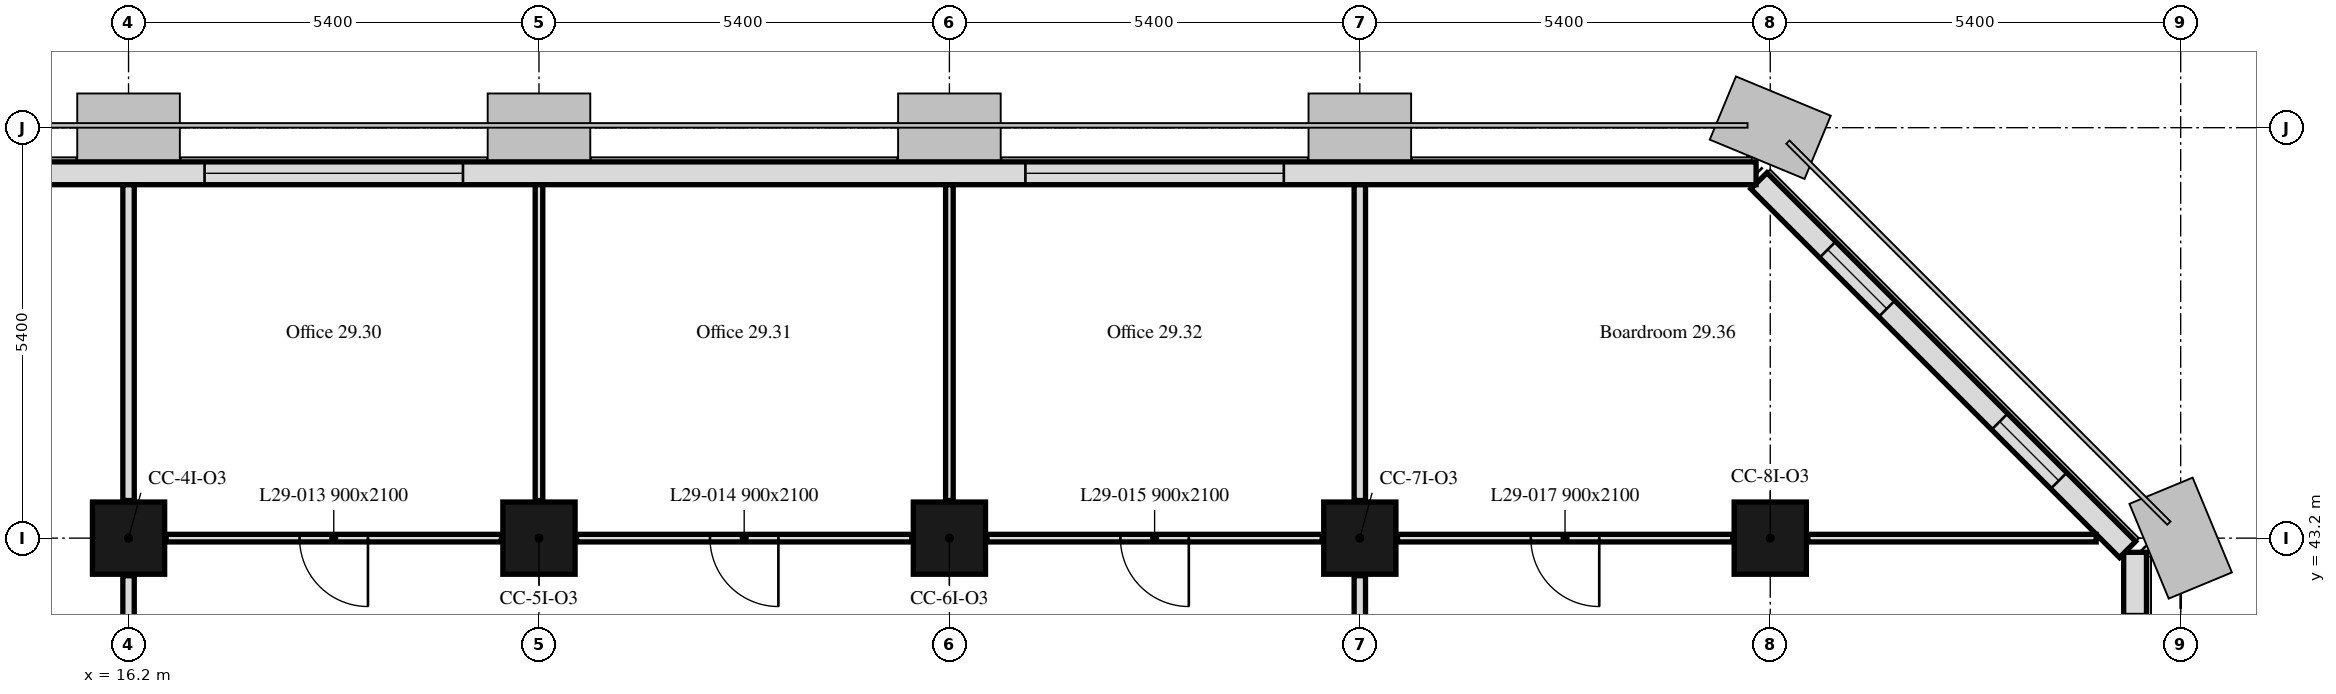
"""IFC4 building model, lengths in metres.
Left out: names, types, materials, properties, quantities, classifications, styles, units other than length and angle.
Written with IfcOpenShell. Run it as: python <this file> out.ifc"""

import sys

from ifc_helpers import new_model, si_unit, direction, frame, frame_2d, origin, origin_2d, place, context, subcontext, project, spatial, rectangle, extrude, element, fill, save


model = new_model("IFC4")
c1 = context("Model", 3, precision=1e-05, world=origin(), true_north=direction((0.0, 1.0)))
c2 = subcontext(c1, "Body", "Model", "MODEL_VIEW")
j1 = project(units=[si_unit("LENGTHUNIT", "METRE"), si_unit("PLANEANGLEUNIT", "RADIAN")], contexts=[c1])
p1 = place(None, origin())
s1 = spatial("IfcSite", under=j1, at=p1, CompositionType="ELEMENT")
p2 = place(p1, origin())
s2 = spatial("IfcBuilding", under=s1, at=p2, CompositionType="ELEMENT")
p3 = place(p2, frame((0.0, 0.0, 122.0)))
s3 = spatial("IfcBuildingStorey", under=s2, at=p3, CompositionType="ELEMENT", Elevation=122.0)
for number, where, z_axis, x_axis in (
    (1, (16.2, 43.2, 0.0), (0.0, 0.0, 1.0), (1.0, 0.0, 0.0)),
    (2, (21.6, 43.2, 0.0), (0.0, 0.0, 1.0), (1.0, 0.0, 0.0)),
    (3, (27.0, 43.2, 0.0), (0.0, 0.0, 1.0), (1.0, 0.0, 0.0)),
    (4, (32.4, 43.2, 0.0), (0.0, 0.0, 1.0), (1.0, 0.0, 0.0)),
    (5, (37.8, 43.2, 0.0), (0.0, 0.0, 1.0), (1.0, 0.0, 0.0)),
):
    element("IfcColumn", number, at=place(p3, frame(where, z_axis=z_axis, x_axis=x_axis)), inside=s3, PredefinedType="COLUMN", context=c2, shape_type="SweptSolid", body=[
        extrude(rectangle(XDim=0.95, YDim=0.95, at=origin_2d()), origin(), (0.0, 0.0, 1.0), 3.3),
    ])
p4 = place(p3, frame((42.6, 32.4, 0.0), z_axis=(0.0, 0.0, 1.0), x_axis=(0.0, 1.0, 0.0)))
e6 = element("IfcWall", 6, at=p4, inside=s3, PredefinedType="SOLIDWALL", context=c2, shape_type="SweptSolid", body=[
    extrude(rectangle(XDim=10.614, YDim=0.3, at=frame_2d((5.307, 0.0))), origin(), (0.0, 0.0, 1.0), 3.3),
])
p5 = place(p4, frame((6.4, 0.0, 0.9)))
e7 = element("IfcOpeningElement", 7, at=p5, cuts=e6, PredefinedType="OPENING", context=c2, shape_type="SweptSolid", body=[
    extrude(rectangle(XDim=3.4, YDim=1.7, at=frame_2d((1.7, 0.85))), frame((0.0, 0.16, 0.0), z_axis=(0.0, -1.0, 0.0), x_axis=(1.0, 0.0, 0.0)), (0.0, 0.0, 1.0), 0.32),
])
p6 = place(p3, frame((42.501, 43.051, 0.0), z_axis=(0.0, 0.0, 1.0), x_axis=(-0.707106781187, 0.707106781187, 0.0)))
e8 = element("IfcWall", 8, at=p6, inside=s3, PredefinedType="SOLIDWALL", context=c2, shape_type="SweptSolid", body=[
    extrude(rectangle(XDim=6.86, YDim=0.3, at=frame_2d((3.43, 0.0))), origin(), (0.0, 0.0, 1.0), 3.3),
])
p7 = place(p6, frame((1.28, 0.0, 0.9)))
e9 = element("IfcOpeningElement", 9, at=p7, cuts=e8, PredefinedType="OPENING", context=c2, shape_type="SweptSolid", body=[
    extrude(rectangle(XDim=1.1, YDim=1.7, at=frame_2d((0.55, 0.85))), frame((0.0, 0.16, 0.0), z_axis=(0.0, -1.0, 0.0), x_axis=(1.0, 0.0, 0.0)), (0.0, 0.0, 1.0), 0.32),
])
p8 = place(p6, frame((4.48, 0.0, 0.9)))
e10 = element("IfcOpeningElement", 10, at=p8, cuts=e8, PredefinedType="OPENING", context=c2, shape_type="SweptSolid", body=[
    extrude(rectangle(XDim=1.1, YDim=1.7, at=frame_2d((0.55, 0.85))), frame((0.0, 0.16, 0.0), z_axis=(0.0, -1.0, 0.0), x_axis=(1.0, 0.0, 0.0)), (0.0, 0.0, 1.0), 0.32),
])
p9 = place(p3, frame((37.614, 48.0, 0.0), z_axis=(0.0, 0.0, 1.0), x_axis=(-1.0, 0.0, 0.0)))
e11 = element("IfcWall", 11, at=p9, inside=s3, PredefinedType="SOLIDWALL", context=c2, shape_type="SweptSolid", body=[
    extrude(rectangle(XDim=32.027, YDim=0.3, at=frame_2d((16.014, 0.0))), origin(), (0.0, 0.0, 1.0), 3.3),
])
p10 = place(p9, frame((6.214, 0.0, 0.9)))
e12 = element("IfcOpeningElement", 12, at=p10, cuts=e11, PredefinedType="OPENING", context=c2, shape_type="SweptSolid", body=[
    extrude(rectangle(XDim=3.4, YDim=1.7, at=frame_2d((1.7, 0.85))), frame((0.0, 0.16, 0.0), z_axis=(0.0, -1.0, 0.0), x_axis=(1.0, 0.0, 0.0)), (0.0, 0.0, 1.0), 0.32),
])
p11 = place(p9, frame((17.014, 0.0, 0.9)))
e13 = element("IfcOpeningElement", 13, at=p11, cuts=e11, PredefinedType="OPENING", context=c2, shape_type="SweptSolid", body=[
    extrude(rectangle(XDim=3.4, YDim=1.7, at=frame_2d((1.7, 0.85))), frame((0.0, 0.16, 0.0), z_axis=(0.0, -1.0, 0.0), x_axis=(1.0, 0.0, 0.0)), (0.0, 0.0, 1.0), 0.32),
])
p12 = place(p9, frame((27.814, 0.0, 0.9)))
e14 = element("IfcOpeningElement", 14, at=p12, cuts=e11, PredefinedType="OPENING", context=c2, shape_type="SweptSolid", body=[
    extrude(rectangle(XDim=3.4, YDim=1.7, at=frame_2d((1.7, 0.85))), frame((0.0, 0.16, 0.0), z_axis=(0.0, -1.0, 0.0), x_axis=(1.0, 0.0, 0.0)), (0.0, 0.0, 1.0), 0.32),
])
p13 = place(p3, frame((16.2, 38.295, 0.0), z_axis=(0.0, 0.0, 1.0), x_axis=(0.0, 1.0, 0.0)))
e15 = element("IfcWall", 15, at=p13, inside=s3, PredefinedType="PARTITIONING", context=c2, shape_type="SweptSolid", body=[
    extrude(rectangle(XDim=4.41, YDim=0.15, at=frame_2d((2.205, 0.0))), origin(), (0.0, 0.0, 1.0), 2.55),
])
p14 = place(p3, frame((16.2, 43.695, 0.0), z_axis=(0.0, 0.0, 1.0), x_axis=(0.0, 1.0, 0.0)))
e16 = element("IfcWall", 16, at=p14, inside=s3, PredefinedType="PARTITIONING", context=c2, shape_type="SweptSolid", body=[
    extrude(rectangle(XDim=4.154, YDim=0.15, at=frame_2d((2.077, 0.0))), origin(), (0.0, 0.0, 1.0), 2.55),
])
p15 = place(p3, frame((32.4, 38.295, 0.0), z_axis=(0.0, 0.0, 1.0), x_axis=(0.0, 1.0, 0.0)))
e17 = element("IfcWall", 17, at=p15, inside=s3, PredefinedType="PARTITIONING", context=c2, shape_type="SweptSolid", body=[
    extrude(rectangle(XDim=4.41, YDim=0.15, at=frame_2d((2.205, 0.0))), origin(), (0.0, 0.0, 1.0), 2.55),
])
p16 = place(p3, frame((31.905, 43.2, 0.0), z_axis=(0.0, 0.0, 1.0), x_axis=(-1.0, 0.0, 0.0)))
e18 = element("IfcWall", 18, at=p16, inside=s3, PredefinedType="PARTITIONING", context=c2, shape_type="SweptSolid", body=[
    extrude(rectangle(XDim=4.41, YDim=0.1, at=frame_2d((2.205, 0.0))), origin(), (0.0, 0.0, 1.0), 3.3),
])
p17 = place(p16, frame((1.755, 0.0, 0.0)))
e19 = element("IfcOpeningElement", 19, at=p17, cuts=e18, PredefinedType="OPENING", context=c2, shape_type="SweptSolid", body=[
    extrude(rectangle(XDim=0.9, YDim=2.1, at=frame_2d((0.45, 1.05))), frame((0.0, 0.05, 0.0), z_axis=(0.0, -1.0, 0.0), x_axis=(1.0, 0.0, 0.0)), (0.0, 0.0, 1.0), 0.1),
])
p18 = place(p3, frame((26.505, 43.2, 0.0), z_axis=(0.0, 0.0, 1.0), x_axis=(-1.0, 0.0, 0.0)))
e20 = element("IfcWall", 20, at=p18, inside=s3, PredefinedType="PARTITIONING", context=c2, shape_type="SweptSolid", body=[
    extrude(rectangle(XDim=4.41, YDim=0.1, at=frame_2d((2.205, 0.0))), origin(), (0.0, 0.0, 1.0), 3.3),
])
p19 = place(p18, frame((1.755, 0.0, 0.0)))
e21 = element("IfcOpeningElement", 21, at=p19, cuts=e20, PredefinedType="OPENING", context=c2, shape_type="SweptSolid", body=[
    extrude(rectangle(XDim=0.9, YDim=2.1, at=frame_2d((0.45, 1.05))), frame((0.0, 0.05, 0.0), z_axis=(0.0, -1.0, 0.0), x_axis=(1.0, 0.0, 0.0)), (0.0, 0.0, 1.0), 0.1),
])
p20 = place(p3, frame((21.105, 43.2, 0.0), z_axis=(0.0, 0.0, 1.0), x_axis=(-1.0, 0.0, 0.0)))
e22 = element("IfcWall", 22, at=p20, inside=s3, PredefinedType="PARTITIONING", context=c2, shape_type="SweptSolid", body=[
    extrude(rectangle(XDim=4.41, YDim=0.1, at=frame_2d((2.205, 0.0))), origin(), (0.0, 0.0, 1.0), 3.3),
])
p21 = place(p20, frame((1.755, 0.0, 0.0)))
e23 = element("IfcOpeningElement", 23, at=p21, cuts=e22, PredefinedType="OPENING", context=c2, shape_type="SweptSolid", body=[
    extrude(rectangle(XDim=0.9, YDim=2.1, at=frame_2d((0.45, 1.05))), frame((0.0, 0.05, 0.0), z_axis=(0.0, -1.0, 0.0), x_axis=(1.0, 0.0, 0.0)), (0.0, 0.0, 1.0), 0.1),
])
for number, where, z_axis, x_axis in (
    (24, (21.6, 43.695, 0.0), (0.0, 0.0, 1.0), (0.0, 1.0, 0.0)),
    (25, (27.0, 43.695, 0.0), (0.0, 0.0, 1.0), (0.0, 1.0, 0.0)),
):
    element("IfcWall", number, at=place(p3, frame(where, z_axis=z_axis, x_axis=x_axis)), inside=s3, PredefinedType="PARTITIONING", context=c2, shape_type="SweptSolid", body=[
        extrude(rectangle(XDim=4.154, YDim=0.1, at=frame_2d((2.077, 0.0))), origin(), (0.0, 0.0, 1.0), 2.55),
    ])
p22 = place(p3, frame((32.4, 43.695, 0.0), z_axis=(0.0, 0.0, 1.0), x_axis=(0.0, 1.0, 0.0)))
e26 = element("IfcWall", 26, at=p22, inside=s3, PredefinedType="PARTITIONING", context=c2, shape_type="SweptSolid", body=[
    extrude(rectangle(XDim=4.154, YDim=0.15, at=frame_2d((2.077, 0.0))), origin(), (0.0, 0.0, 1.0), 2.55),
])
p23 = place(p3, frame((42.088, 43.2, 0.0), z_axis=(0.0, 0.0, 1.0), x_axis=(-1.0, 0.0, 0.0)))
e27 = element("IfcWall", 27, at=p23, inside=s3, PredefinedType="PARTITIONING", context=c2, shape_type="SweptSolid", body=[
    extrude(rectangle(XDim=3.793, YDim=0.1, at=frame_2d((1.896, 0.0))), origin(), (0.0, 0.0, 1.0), 3.3),
])
p24 = place(p3, frame((37.305, 43.2, 0.0), z_axis=(0.0, 0.0, 1.0), x_axis=(-1.0, 0.0, 0.0)))
e28 = element("IfcWall", 28, at=p24, inside=s3, PredefinedType="PARTITIONING", context=c2, shape_type="SweptSolid", body=[
    extrude(rectangle(XDim=4.41, YDim=0.1, at=frame_2d((2.205, 0.0))), origin(), (0.0, 0.0, 1.0), 3.3),
])
p25 = place(p24, frame((1.755, 0.0, 0.0)))
e29 = element("IfcOpeningElement", 29, at=p25, cuts=e28, PredefinedType="OPENING", context=c2, shape_type="SweptSolid", body=[
    extrude(rectangle(XDim=0.9, YDim=2.1, at=frame_2d((0.45, 1.05))), frame((0.0, 0.05, 0.0), z_axis=(0.0, -1.0, 0.0), x_axis=(1.0, 0.0, 0.0)), (0.0, 0.0, 1.0), 0.1),
])
p26 = place(p7, origin())
e30 = element("IfcWindow", 30, at=p26, inside=s3, PartitioningType="SINGLE_PANEL", PredefinedType="WINDOW", context=c2, shape_type="SweptSolid", body=[
    extrude(rectangle(XDim=1.1, YDim=1.7, at=frame_2d((0.55, 0.85))), frame((0.0, 0.03, 0.0), z_axis=(0.0, -1.0, 0.0), x_axis=(1.0, 0.0, 0.0)), (0.0, 0.0, 1.0), 0.06),
])
fill(e9, e30)
p27 = place(p8, origin())
e31 = element("IfcWindow", 31, at=p27, inside=s3, PartitioningType="SINGLE_PANEL", PredefinedType="WINDOW", context=c2, shape_type="SweptSolid", body=[
    extrude(rectangle(XDim=1.1, YDim=1.7, at=frame_2d((0.55, 0.85))), frame((0.0, 0.03, 0.0), z_axis=(0.0, -1.0, 0.0), x_axis=(1.0, 0.0, 0.0)), (0.0, 0.0, 1.0), 0.06),
])
fill(e10, e31)
p28 = place(p10, origin())
e32 = element("IfcWindow", 32, at=p28, inside=s3, PartitioningType="SINGLE_PANEL", PredefinedType="WINDOW", context=c2, shape_type="SweptSolid", body=[
    extrude(rectangle(XDim=3.4, YDim=1.7, at=frame_2d((1.7, 0.85))), frame((0.0, 0.03, 0.0), z_axis=(0.0, -1.0, 0.0), x_axis=(1.0, 0.0, 0.0)), (0.0, 0.0, 1.0), 0.06),
])
fill(e12, e32)
p29 = place(p11, origin())
e33 = element("IfcWindow", 33, at=p29, inside=s3, PartitioningType="SINGLE_PANEL", PredefinedType="WINDOW", context=c2, shape_type="SweptSolid", body=[
    extrude(rectangle(XDim=3.4, YDim=1.7, at=frame_2d((1.7, 0.85))), frame((0.0, 0.03, 0.0), z_axis=(0.0, -1.0, 0.0), x_axis=(1.0, 0.0, 0.0)), (0.0, 0.0, 1.0), 0.06),
])
fill(e13, e33)
p30 = place(p21, origin())
e34 = element("IfcDoor", 34, at=p30, inside=s3, OperationType="SINGLE_SWING_RIGHT", PredefinedType="DOOR", context=c2, shape_type="SweptSolid", body=[
    extrude(rectangle(XDim=0.9, YDim=2.1, at=frame_2d((0.45, 1.05))), frame((0.0, 0.025, 0.0), z_axis=(0.0, -1.0, 0.0), x_axis=(1.0, 0.0, 0.0)), (0.0, 0.0, 1.0), 0.05),
])
fill(e23, e34)
p31 = place(p19, origin())
e35 = element("IfcDoor", 35, at=p31, inside=s3, OperationType="SINGLE_SWING_RIGHT", PredefinedType="DOOR", context=c2, shape_type="SweptSolid", body=[
    extrude(rectangle(XDim=0.9, YDim=2.1, at=frame_2d((0.45, 1.05))), frame((0.0, 0.025, 0.0), z_axis=(0.0, -1.0, 0.0), x_axis=(1.0, 0.0, 0.0)), (0.0, 0.0, 1.0), 0.05),
])
fill(e21, e35)
p32 = place(p17, origin())
e36 = element("IfcDoor", 36, at=p32, inside=s3, OperationType="SINGLE_SWING_RIGHT", PredefinedType="DOOR", context=c2, shape_type="SweptSolid", body=[
    extrude(rectangle(XDim=0.9, YDim=2.1, at=frame_2d((0.45, 1.05))), frame((0.0, 0.025, 0.0), z_axis=(0.0, -1.0, 0.0), x_axis=(1.0, 0.0, 0.0)), (0.0, 0.0, 1.0), 0.05),
])
fill(e19, e36)
p33 = place(p25, origin())
e37 = element("IfcDoor", 37, at=p33, inside=s3, OperationType="SINGLE_SWING_RIGHT", PredefinedType="DOOR", context=c2, shape_type="SweptSolid", body=[
    extrude(rectangle(XDim=0.9, YDim=2.1, at=frame_2d((0.45, 1.05))), frame((0.0, 0.025, 0.0), z_axis=(0.0, -1.0, 0.0), x_axis=(1.0, 0.0, 0.0)), (0.0, 0.0, 1.0), 0.05),
])
fill(e29, e37)
save(model, sys.argv[1])
